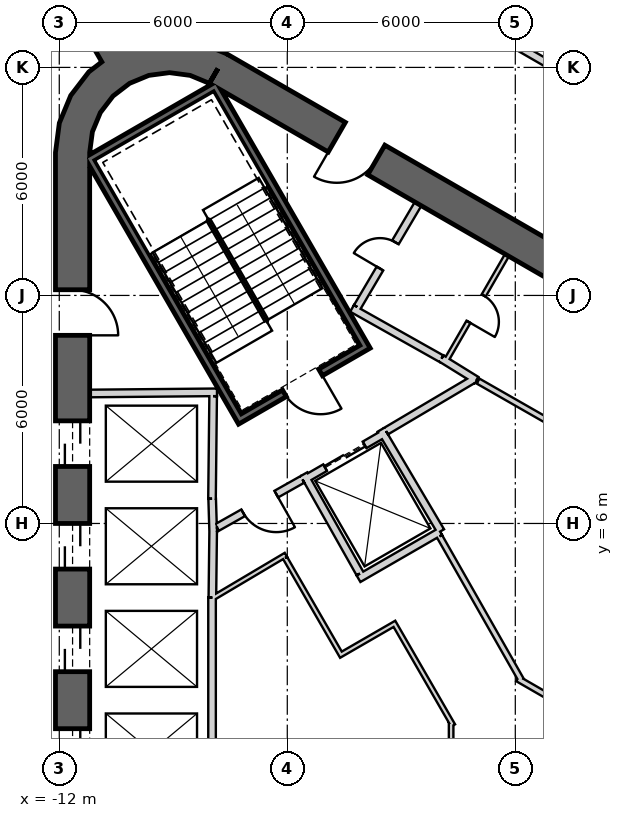
"""IFC4 building model, lengths in metres.
Left out: names, types, materials, properties, quantities, classifications, styles, units other than length and angle.
Written with IfcOpenShell. Run it as: python <this file> out.ifc"""

import sys

from ifc_helpers import new_model, si_unit, direction, frame, frame_2d, origin, place, context, subcontext, project, spatial, polyline, rectangle, outline, extrude, element, fill, save


model = new_model("IFC4")
c1 = context("Model", 3, precision=1e-05, world=origin(), true_north=direction((0.0, 1.0)))
c2 = subcontext(c1, "Body", "Model", "MODEL_VIEW")
j1 = project(units=[si_unit("LENGTHUNIT", "METRE"), si_unit("PLANEANGLEUNIT", "RADIAN")], contexts=[c1])
p1 = place(None, origin())
s1 = spatial("IfcSite", under=j1, at=p1, CompositionType="ELEMENT")
p2 = place(p1, origin())
s2 = spatial("IfcBuilding", under=s1, at=p2, CompositionType="ELEMENT")
p3 = place(p2, frame((0.0, 0.0, 169.2)))
s3 = spatial("IfcBuildingStorey", under=s2, at=p3, CompositionType="ELEMENT", Elevation=169.2)
p4 = place(p3, frame((19.475, 2.208, 0.0), z_axis=(0.0, 0.0, 1.0), x_axis=(-0.866028369851, 0.499994862586, 0.0)))
e1 = element("IfcWall", 1, at=p4, inside=s3, PredefinedType="SHEAR", context=c2, shape_type="SweptSolid", body=[
    extrude(rectangle(XDim=31.523, YDim=0.9, at=frame_2d((15.762, 0.0))), origin(), (0.0, 0.0, 1.0), 4.0),
])
p5 = place(p4, frame((7.062, 0.0, 0.0)))
e2 = element("IfcOpeningElement", 2, at=p5, cuts=e1, PredefinedType="OPENING", context=c2, shape_type="SweptSolid", body=[
    extrude(rectangle(XDim=1.2, YDim=2.4, at=frame_2d((0.6, 1.2))), frame((0.0, 0.46, 0.0), z_axis=(0.0, -1.0, 0.0), x_axis=(1.0, 0.0, 0.0)), (0.0, 0.0, 1.0), 0.92),
])
p6 = place(p4, frame((3.612, 0.0, 0.0)))
e3 = element("IfcOpeningElement", 3, at=p6, cuts=e1, PredefinedType="OPENING", context=c2, shape_type="SweptSolid", body=[
    extrude(rectangle(XDim=1.2, YDim=2.4, at=frame_2d((0.6, 1.2))), frame((0.0, 0.46, 0.0), z_axis=(0.0, -1.0, 0.0), x_axis=(1.0, 0.0, 0.0)), (0.0, 0.0, 1.0), 0.92),
])
p7 = place(p4, frame((26.712, 0.0, 0.0)))
e4 = element("IfcOpeningElement", 4, at=p7, cuts=e1, PredefinedType="OPENING", context=c2, shape_type="SweptSolid", body=[
    extrude(rectangle(XDim=1.2, YDim=2.4, at=frame_2d((0.6, 1.2))), frame((0.0, 0.46, 0.0), z_axis=(0.0, -1.0, 0.0), x_axis=(1.0, 0.0, 0.0)), (0.0, 0.0, 1.0), 0.92),
])
p8 = place(p3, frame((-11.65, 15.762, 0.0), z_axis=(0.0, 0.0, 1.0), x_axis=(0.0, -1.0, 0.0)))
e5 = element("IfcWall", 5, at=p8, inside=s3, PredefinedType="SHEAR", context=c2, shape_type="SweptSolid", body=[
    extrude(rectangle(XDim=31.523, YDim=0.9, at=frame_2d((15.762, 0.0))), origin(), (0.0, 0.0, 1.0), 4.0),
])
p9 = place(p8, frame((7.062, 0.0, 0.0)))
e6 = element("IfcOpeningElement", 6, at=p9, cuts=e5, PredefinedType="OPENING", context=c2, shape_type="SweptSolid", body=[
    extrude(rectangle(XDim=1.2, YDim=2.4, at=frame_2d((0.6, 1.2))), frame((0.0, 0.46, 0.0), z_axis=(0.0, -1.0, 0.0), x_axis=(1.0, 0.0, 0.0)), (0.0, 0.0, 1.0), 0.92),
])
p10 = place(p8, frame((9.762, 0.0, 0.0)))
e7 = element("IfcOpeningElement", 7, at=p10, cuts=e5, PredefinedType="OPENING", context=c2, shape_type="SweptSolid", body=[
    extrude(rectangle(XDim=1.2, YDim=2.4, at=frame_2d((0.6, 1.2))), frame((0.0, 0.46, 0.0), z_axis=(0.0, -1.0, 0.0), x_axis=(1.0, 0.0, 0.0)), (0.0, 0.0, 1.0), 0.92),
])
p11 = place(p8, frame((12.462, 0.0, 0.0)))
e8 = element("IfcOpeningElement", 8, at=p11, cuts=e5, PredefinedType="OPENING", context=c2, shape_type="SweptSolid", body=[
    extrude(rectangle(XDim=1.2, YDim=2.4, at=frame_2d((0.6, 1.2))), frame((0.0, 0.46, 0.0), z_axis=(0.0, -1.0, 0.0), x_axis=(1.0, 0.0, 0.0)), (0.0, 0.0, 1.0), 0.92),
])
p12 = place(p8, frame((15.162, 0.0, 0.0)))
e9 = element("IfcOpeningElement", 9, at=p12, cuts=e5, PredefinedType="OPENING", context=c2, shape_type="SweptSolid", body=[
    extrude(rectangle(XDim=1.2, YDim=2.4, at=frame_2d((0.6, 1.2))), frame((0.0, 0.46, 0.0), z_axis=(0.0, -1.0, 0.0), x_axis=(1.0, 0.0, 0.0)), (0.0, 0.0, 1.0), 0.92),
])
p13 = place(p8, frame((17.862, 0.0, 0.0)))
e10 = element("IfcOpeningElement", 10, at=p13, cuts=e5, PredefinedType="OPENING", context=c2, shape_type="SweptSolid", body=[
    extrude(rectangle(XDim=1.2, YDim=2.4, at=frame_2d((0.6, 1.2))), frame((0.0, 0.46, 0.0), z_axis=(0.0, -1.0, 0.0), x_axis=(1.0, 0.0, 0.0)), (0.0, 0.0, 1.0), 0.92),
])
p14 = place(p8, frame((20.562, 0.0, 0.0)))
e11 = element("IfcOpeningElement", 11, at=p14, cuts=e5, PredefinedType="OPENING", context=c2, shape_type="SweptSolid", body=[
    extrude(rectangle(XDim=1.2, YDim=2.4, at=frame_2d((0.6, 1.2))), frame((0.0, 0.46, 0.0), z_axis=(0.0, -1.0, 0.0), x_axis=(1.0, 0.0, 0.0)), (0.0, 0.0, 1.0), 0.92),
])
p15 = place(p8, frame((23.262, 0.0, 0.0)))
e12 = element("IfcOpeningElement", 12, at=p15, cuts=e5, PredefinedType="OPENING", context=c2, shape_type="SweptSolid", body=[
    extrude(rectangle(XDim=1.2, YDim=2.4, at=frame_2d((0.6, 1.2))), frame((0.0, 0.46, 0.0), z_axis=(0.0, -1.0, 0.0), x_axis=(1.0, 0.0, 0.0)), (0.0, 0.0, 1.0), 0.92),
])
p16 = place(p8, frame((3.612, 0.0, 0.0)))
e13 = element("IfcOpeningElement", 13, at=p16, cuts=e5, PredefinedType="OPENING", context=c2, shape_type="SweptSolid", body=[
    extrude(rectangle(XDim=1.2, YDim=2.4, at=frame_2d((0.6, 1.2))), frame((0.0, 0.46, 0.0), z_axis=(0.0, -1.0, 0.0), x_axis=(1.0, 0.0, 0.0)), (0.0, 0.0, 1.0), 0.92),
])
p17 = place(p8, frame((26.712, 0.0, 0.0)))
e14 = element("IfcOpeningElement", 14, at=p17, cuts=e5, PredefinedType="OPENING", context=c2, shape_type="SweptSolid", body=[
    extrude(rectangle(XDim=1.2, YDim=2.4, at=frame_2d((0.6, 1.2))), frame((0.0, 0.46, 0.0), z_axis=(0.0, -1.0, 0.0), x_axis=(1.0, 0.0, 0.0)), (0.0, 0.0, 1.0), 0.92),
])
p18 = place(p3, origin())
e15 = element("IfcWall", 15, at=p18, inside=s3, PredefinedType="SHEAR", context=c2, shape_type="SweptSolid", body=[
    extrude(outline(polyline([(-7.6, 18.36), (-8.323, 18.659), (-9.1, 18.762), (-9.876, 18.659), (-10.6, 18.36), (-11.221, 17.883), (-11.698, 17.262), (-11.998, 16.538), (-12.1, 15.762), (-11.2, 15.762), (-11.128, 16.305), (-10.919, 16.812), (-10.585, 17.247), (-10.15, 17.58), (-9.644, 17.79), (-9.1, 17.862), (-8.556, 17.79), (-8.05, 17.58), (-7.6, 18.36)])), origin(), (0.0, 0.0, 1.0), 4.0),
])
p19 = place(p3, frame((-10.575, 18.316, 0.0), z_axis=(0.0, 0.0, 1.0), x_axis=(-0.499995558535, 0.86602796805, 0.0)))
e16 = element("IfcWall", 16, at=p19, inside=s3, PredefinedType="SHEAR", context=c2, shape_type="SweptSolid", body=[
    extrude(rectangle(XDim=12.433, YDim=0.7, at=frame_2d((6.216, 0.0))), origin(), (0.0, 0.0, 1.0), 4.0),
])
p20 = place(p3, frame((-11.2, 9.42, 0.0), z_axis=(0.0, 0.0, 1.0), x_axis=(0.999957167047, 0.009255488683, 0.0)))
e17 = element("IfcWall", 17, at=p20, inside=s3, PredefinedType="PLUMBINGWALL", context=c2, shape_type="SweptSolid", body=[
    extrude(rectangle(XDim=3.35, YDim=0.2, at=frame_2d((1.675, 0.0))), origin(), (0.0, 0.0, 1.0), 3.7),
])
p21 = place(p3, frame((-7.951, 9.35, 0.0), z_axis=(0.0, 0.0, 1.0), x_axis=(-0.011120469654, -0.999938165666, 0.0)))
e18 = element("IfcWall", 18, at=p21, inside=s3, PredefinedType="PLUMBINGWALL", context=c2, shape_type="SweptSolid", body=[
    extrude(rectangle(XDim=2.7, YDim=0.2, at=frame_2d((1.35, 0.0))), origin(), (0.0, 0.0, 1.0), 3.7),
])
p22 = place(p3, frame((-7.977, 6.65, 0.0), z_axis=(0.0, 0.0, 1.0), x_axis=(0.030861509705, -0.999523670164, 0.0)))
e19 = element("IfcWall", 19, at=p22, inside=s3, PredefinedType="PLUMBINGWALL", context=c2, shape_type="SweptSolid", body=[
    extrude(rectangle(XDim=0.878, YDim=0.2, at=frame_2d((0.439, 0.0))), origin(), (0.0, 0.0, 1.0), 3.7),
])
p23 = place(p3, frame((-7.949, 5.895, 0.0), z_axis=(0.0, 0.0, 1.0), x_axis=(-0.012042535896, -0.999927486035, 0.0)))
e20 = element("IfcWall", 20, at=p23, inside=s3, PredefinedType="PLUMBINGWALL", context=c2, shape_type="SweptSolid", body=[
    extrude(rectangle(XDim=1.845, YDim=0.2, at=frame_2d((0.922, 0.0))), origin(), (0.0, 0.0, 1.0), 3.7),
])
p24 = place(p3, frame((-7.98, 4.05, 0.0), z_axis=(0.0, 0.0, 1.0), x_axis=(0.0, -1.0, 0.0)))
e21 = element("IfcWall", 21, at=p24, inside=s3, PredefinedType="PLUMBINGWALL", context=c2, shape_type="SweptSolid", body=[
    extrude(rectangle(XDim=8.1, YDim=0.2, at=frame_2d((4.05, 0.0))), origin(), (0.0, 0.0, 1.0), 3.7),
])
p25 = place(p3, frame((-11.245, 15.678, -0.3), z_axis=(0.0, 0.0, 1.0), x_axis=(0.499977274689, -0.866038523851, 0.0)))
e22 = element("IfcWall", 22, at=p25, inside=s3, PredefinedType="SHEAR", context=c2, shape_type="SweptSolid", body=[
    extrude(rectangle(XDim=8.1, YDim=0.2, at=frame_2d((4.05, 0.0))), origin(), (0.0, 0.0, 1.0), 4.0),
])
p26 = place(p3, frame((-7.818, 17.541, -0.3), z_axis=(0.0, 0.0, 1.0), x_axis=(-0.866044365799, -0.499967155389, 0.0)))
e23 = element("IfcWall", 23, at=p26, inside=s3, PredefinedType="SHEAR", context=c2, shape_type="SweptSolid", body=[
    extrude(rectangle(XDim=3.8, YDim=0.2, at=frame_2d((1.9, 0.0))), origin(), (0.0, 0.0, 1.0), 4.0),
])
p27 = place(p3, frame((-7.854, 17.405, -0.3), z_axis=(0.0, 0.0, 1.0), x_axis=(0.499997992926, -0.866026562566, 0.0)))
e24 = element("IfcWall", 24, at=p27, inside=s3, PredefinedType="SHEAR", context=c2, shape_type="SweptSolid", body=[
    extrude(rectangle(XDim=7.9, YDim=0.2, at=frame_2d((3.95, 0.0))), origin(), (0.0, 0.0, 1.0), 4.0),
])
p28 = place(p3, frame((-7.159, 8.8, -0.3), z_axis=(0.0, 0.0, 1.0), x_axis=(0.866047807691, 0.499961193289, 0.0)))
e25 = element("IfcWall", 25, at=p28, inside=s3, PredefinedType="SHEAR", context=c2, shape_type="SweptSolid", body=[
    extrude(rectangle(XDim=3.6, YDim=0.2, at=frame_2d((1.8, 0.0))), origin(), (0.0, 0.0, 1.0), 4.0),
])
p29 = place(p28, frame((1.25, 0.0, 0.3)))
e26 = element("IfcOpeningElement", 26, at=p29, cuts=e25, PredefinedType="OPENING", context=c2, shape_type="SweptSolid", body=[
    extrude(rectangle(XDim=1.1, YDim=2.1, at=frame_2d((0.55, 1.05))), frame((0.0, 0.11, 0.0), z_axis=(0.0, -1.0, 0.0), x_axis=(1.0, 0.0, 0.0)), (0.0, 0.0, 1.0), 0.22),
])
p30 = place(p3, frame((-5.524, 7.168, 0.0), z_axis=(0.0, 0.0, 1.0), x_axis=(0.866024647952, 0.500001309137, 0.0)))
e27 = element("IfcWall", 27, at=p30, inside=s3, PredefinedType="PLUMBINGWALL", context=c2, shape_type="SweptSolid", body=[
    extrude(rectangle(XDim=2.4, YDim=0.2, at=frame_2d((1.2, 0.0))), origin(), (0.0, 0.0, 1.0), 3.7),
])
p31 = place(p30, frame((0.6, 0.0, 0.0)))
e28 = element("IfcOpeningElement", 28, at=p31, cuts=e27, PredefinedType="OPENING", context=c2, shape_type="SweptSolid", body=[
    extrude(rectangle(XDim=1.2, YDim=2.4, at=frame_2d((0.6, 1.2))), frame((0.0, 0.11, 0.0), z_axis=(0.0, -1.0, 0.0), x_axis=(1.0, 0.0, 0.0)), (0.0, 0.0, 1.0), 0.22),
])
p32 = place(p3, frame((-3.538, 8.465, 0.0), z_axis=(0.0, 0.0, 1.0), x_axis=(0.508647062354, -0.860975125052, 0.0)))
e29 = element("IfcWall", 29, at=p32, inside=s3, PredefinedType="PLUMBINGWALL", context=c2, shape_type="SweptSolid", body=[
    extrude(rectangle(XDim=3.1, YDim=0.2, at=frame_2d((1.55, 0.0))), origin(), (0.0, 0.0, 1.0), 3.7),
])
p33 = place(p3, frame((-1.979, 5.786, 0.0), z_axis=(0.0, 0.0, 1.0), x_axis=(-0.866016689309, -0.500015093611, 0.0)))
e30 = element("IfcWall", 30, at=p33, inside=s3, PredefinedType="PLUMBINGWALL", context=c2, shape_type="SweptSolid", body=[
    extrude(rectangle(XDim=2.479, YDim=0.2, at=frame_2d((1.24, 0.0))), origin(), (0.0, 0.0, 1.0), 3.7),
])
p34 = place(p3, frame((-5.562, 7.296, 0.0), z_axis=(0.0, 0.0, 1.0), x_axis=(0.49134651263, -0.870964180966, 0.0)))
e31 = element("IfcWall", 31, at=p34, inside=s3, PredefinedType="PLUMBINGWALL", context=c2, shape_type="SweptSolid", body=[
    extrude(rectangle(XDim=3.0, YDim=0.2, at=frame_2d((1.5, 0.0))), origin(), (0.0, 0.0, 1.0), 3.7),
])
p35 = place(p3, frame((-0.22, 13.06, 0.0), z_axis=(0.0, 0.0, 1.0), x_axis=(-0.499984717929, -0.866034226713, 0.0)))
e32 = element("IfcWall", 32, at=p35, inside=s3, PredefinedType="PARTITIONING", context=c2, shape_type="SweptSolid", body=[
    extrude(rectangle(XDim=3.25, YDim=0.12, at=frame_2d((1.625, 0.0))), origin(), (0.0, 0.0, 1.0), 3.7),
])
p36 = place(p35, frame((1.225, 0.0, 0.0)))
e33 = element("IfcOpeningElement", 33, at=p36, cuts=e32, PredefinedType="OPENING", context=c2, shape_type="SweptSolid", body=[
    extrude(rectangle(XDim=0.8, YDim=2.1, at=frame_2d((0.4, 1.05))), frame((0.0, 0.07, 0.0), z_axis=(0.0, -1.0, 0.0), x_axis=(1.0, 0.0, 0.0)), (0.0, 0.0, 1.0), 0.14),
])
p37 = place(p3, frame((-1.941, 10.339, 0.0), z_axis=(0.0, 0.0, 1.0), x_axis=(0.850216889117, -0.526432561171, 0.0)))
e34 = element("IfcWall", 34, at=p37, inside=s3, PredefinedType="PARTITIONING", context=c2, shape_type="SweptSolid", body=[
    extrude(rectangle(XDim=1.078, YDim=0.2, at=frame_2d((0.539, 0.0))), origin(), (0.0, 0.0, 1.0), 3.7),
])
p38 = place(p3, frame((5.159, 6.236, 0.0), z_axis=(0.0, 0.0, 1.0), x_axis=(-0.868105023632, 0.496380567654, 0.0)))
e35 = element("IfcWall", 35, at=p38, inside=s3, PredefinedType="PLUMBINGWALL", context=c2, shape_type="SweptSolid", body=[
    extrude(rectangle(XDim=7.072, YDim=0.15, at=frame_2d((3.536, 0.0))), origin(), (0.0, 0.0, 1.0), 3.7),
])
p39 = place(p3, frame((-4.296, 11.659, 0.0), z_axis=(0.0, 0.0, 1.0), x_axis=(0.871534483978, -0.490334215854, 0.0)))
e36 = element("IfcWall", 36, at=p39, inside=s3, PredefinedType="PARTITIONING", context=c2, shape_type="SweptSolid", body=[
    extrude(rectangle(XDim=2.7, YDim=0.2, at=frame_2d((1.35, 0.0))), origin(), (0.0, 0.0, 1.0), 3.7),
])
p40 = place(p3, frame((-2.558, 14.409, 0.0), z_axis=(0.0, 0.0, 1.0), x_axis=(-0.508018930956, -0.861345903683, 0.0)))
e37 = element("IfcWall", 37, at=p40, inside=s3, PredefinedType="PARTITIONING", context=c2, shape_type="SweptSolid", body=[
    extrude(rectangle(XDim=3.15, YDim=0.2, at=frame_2d((1.575, 0.0))), origin(), (0.0, 0.0, 1.0), 3.7),
])
p41 = place(p40, frame((1.175, 0.0, 0.0)))
e38 = element("IfcOpeningElement", 38, at=p41, cuts=e37, PredefinedType="OPENING", context=c2, shape_type="SweptSolid", body=[
    extrude(rectangle(XDim=0.8, YDim=2.1, at=frame_2d((0.4, 1.05))), frame((0.0, 0.11, 0.0), z_axis=(0.0, -1.0, 0.0), x_axis=(1.0, 0.0, 0.0)), (0.0, 0.0, 1.0), 0.22),
])
p42 = place(p3, frame((-1.055, 9.818, 0.0), z_axis=(0.0, 0.0, 1.0), x_axis=(-0.860614334655, -0.50925726994, 0.0)))
e39 = element("IfcWall", 39, at=p42, inside=s3, PredefinedType="PARTITIONING", context=c2, shape_type="SweptSolid", body=[
    extrude(rectangle(XDim=2.726, YDim=0.2, at=frame_2d((1.363, 0.0))), origin(), (0.0, 0.0, 1.0), 3.7),
])
p43 = place(p3, frame((-5.6, 7.16, 0.0), z_axis=(0.0, 0.0, 1.0), x_axis=(-0.871363259478, -0.490638431059, 0.0)))
e40 = element("IfcWall", 40, at=p43, inside=s3, PredefinedType="PARTITIONING", context=c2, shape_type="SweptSolid", body=[
    extrude(rectangle(XDim=2.581, YDim=0.2, at=frame_2d((1.291, 0.0))), origin(), (0.0, 0.0, 1.0), 3.7),
])
p44 = place(p43, frame((0.791, 0.0, 0.0)))
e41 = element("IfcOpeningElement", 41, at=p44, cuts=e40, PredefinedType="OPENING", context=c2, shape_type="SweptSolid", body=[
    extrude(rectangle(XDim=1.0, YDim=2.1, at=frame_2d((0.5, 1.05))), frame((0.0, 0.11, 0.0), z_axis=(0.0, -1.0, 0.0), x_axis=(1.0, 0.0, 0.0)), (0.0, 0.0, 1.0), 0.22),
])
p45 = place(p3, frame((0.062, 1.914, 0.0), z_axis=(0.0, 0.0, 1.0), x_axis=(0.866018462269, -0.500012022864, 0.0)))
e42 = element("IfcWall", 42, at=p45, inside=s3, PredefinedType="PLUMBINGWALL", context=c2, shape_type="SweptSolid", body=[
    extrude(rectangle(XDim=1.654, YDim=0.15, at=frame_2d((0.827, 0.0))), origin(), (0.0, 0.0, 1.0), 3.7),
])
p46 = place(p3, frame((-1.994, 5.661, 0.0), z_axis=(0.0, 0.0, 1.0), x_axis=(0.494341211302, -0.869267948798, 0.0)))
e43 = element("IfcWall", 43, at=p46, inside=s3, PredefinedType="PLUMBINGWALL", context=c2, shape_type="SweptSolid", body=[
    extrude(rectangle(XDim=4.361, YDim=0.15, at=frame_2d((2.18, 0.0))), origin(), (0.0, 0.0, 1.0), 3.7),
])
p47 = place(p3, frame((-6.037, 5.176, 0.0), z_axis=(0.0, 0.0, 1.0), x_axis=(-0.860106072674, -0.510115225953, 0.0)))
e44 = element("IfcWall", 44, at=p47, inside=s3, PredefinedType="PARTITIONING", context=c2, shape_type="SweptSolid", body=[
    extrude(rectangle(XDim=2.225, YDim=0.12, at=frame_2d((1.112, 0.0))), origin(), (0.0, 0.0, 1.0), 3.7),
])
p48 = place(p3, frame((-4.558, 2.495, 0.0), z_axis=(0.0, 0.0, 1.0), x_axis=(-0.499990139034, 0.866031096941, 0.0)))
e45 = element("IfcWall", 45, at=p48, inside=s3, PredefinedType="PARTITIONING", context=c2, shape_type="SweptSolid", body=[
    extrude(rectangle(XDim=3.0, YDim=0.12, at=frame_2d((1.5, 0.0))), origin(), (0.0, 0.0, 1.0), 3.7),
])
p49 = place(p3, frame((-3.129, 3.39, 0.0), z_axis=(0.0, 0.0, 1.0), x_axis=(-0.866053003207, -0.499952193351, 0.0)))
e46 = element("IfcWall", 46, at=p49, inside=s3, PredefinedType="PARTITIONING", context=c2, shape_type="SweptSolid", body=[
    extrude(rectangle(XDim=1.625, YDim=0.12, at=frame_2d((0.812, 0.0))), origin(), (0.0, 0.0, 1.0), 3.7),
])
p50 = place(p3, frame((-1.637, 0.685, 0.0), z_axis=(0.0, 0.0, 1.0), x_axis=(-0.500006252586, 0.866021793822, 0.0)))
e47 = element("IfcWall", 47, at=p50, inside=s3, PredefinedType="PARTITIONING", context=c2, shape_type="SweptSolid", body=[
    extrude(rectangle(XDim=3.028, YDim=0.12, at=frame_2d((1.514, 0.0))), origin(), (0.0, 0.0, 1.0), 3.7),
])
p51 = place(p3, frame((-1.689, -0.879, 0.0), z_axis=(0.0, 0.0, 1.0), x_axis=(0.0, 1.0, 0.0)))
e48 = element("IfcWall", 48, at=p51, inside=s3, PredefinedType="PARTITIONING", context=c2, shape_type="SweptSolid", body=[
    extrude(rectangle(XDim=1.635, YDim=0.12, at=frame_2d((0.818, 0.0))), origin(), (0.0, 0.0, 1.0), 3.7),
])
p52 = place(p3, frame((4.283, 16.118, 0.0), z_axis=(0.0, 0.0, 1.0), x_axis=(-0.866016186489, 0.500015964484, 0.0)))
e49 = element("IfcWall", 49, at=p52, inside=s3, PredefinedType="PARTITIONING", context=c2, shape_type="SweptSolid", body=[
    extrude(rectangle(XDim=12.096, YDim=0.2, at=frame_2d((6.048, 0.0))), origin(), (0.0, 0.0, 1.0), 2.88),
])
p53 = place(p29, origin())
e50 = element("IfcDoor", 50, at=p53, inside=s3, OperationType="SINGLE_SWING_LEFT", PredefinedType="USERDEFINED", context=c2, shape_type="SweptSolid", body=[
    extrude(rectangle(XDim=1.1, YDim=2.1, at=frame_2d((0.55, 1.05))), frame((0.0, 0.025, 0.0), z_axis=(0.0, -1.0, 0.0), x_axis=(1.0, 0.0, 0.0)), (0.0, 0.0, 1.0), 0.05),
])
fill(e26, e50)
p54 = place(p44, origin())
e51 = element("IfcDoor", 51, at=p54, inside=s3, OperationType="SINGLE_SWING_LEFT", PredefinedType="USERDEFINED", context=c2, shape_type="SweptSolid", body=[
    extrude(rectangle(XDim=1.0, YDim=2.1, at=frame_2d((0.5, 1.05))), frame((0.0, 0.025, 0.0), z_axis=(0.0, -1.0, 0.0), x_axis=(1.0, 0.0, 0.0)), (0.0, 0.0, 1.0), 0.05),
])
fill(e41, e51)
p55 = place(p31, origin())
e52 = element("IfcDoor", 52, at=p55, inside=s3, OperationType="SLIDING_TO_LEFT", PredefinedType="USERDEFINED", context=c2, shape_type="SweptSolid", body=[
    extrude(rectangle(XDim=1.2, YDim=2.4, at=frame_2d((0.6, 1.2))), frame((0.0, 0.025, 0.0), z_axis=(0.0, -1.0, 0.0), x_axis=(1.0, 0.0, 0.0)), (0.0, 0.0, 1.0), 0.05),
])
fill(e28, e52)
p56 = place(p41, origin())
e53 = element("IfcDoor", 53, at=p56, inside=s3, OperationType="SINGLE_SWING_LEFT", PredefinedType="USERDEFINED", context=c2, shape_type="SweptSolid", body=[
    extrude(rectangle(XDim=0.8, YDim=2.1, at=frame_2d((0.4, 1.05))), frame((0.0, 0.025, 0.0), z_axis=(0.0, -1.0, 0.0), x_axis=(1.0, 0.0, 0.0)), (0.0, 0.0, 1.0), 0.05),
])
fill(e38, e53)
p57 = place(p36, origin())
e54 = element("IfcDoor", 54, at=p57, inside=s3, OperationType="SINGLE_SWING_LEFT", PredefinedType="USERDEFINED", context=c2, shape_type="SweptSolid", body=[
    extrude(rectangle(XDim=0.8, YDim=2.1, at=frame_2d((0.4, 1.05))), frame((0.0, 0.025, 0.0), z_axis=(0.0, -1.0, 0.0), x_axis=(1.0, 0.0, 0.0)), (0.0, 0.0, 1.0), 0.05),
])
fill(e33, e54)
p58 = place(p9, origin())
e55 = element("IfcDoor", 55, at=p58, inside=s3, OperationType="SLIDING_TO_LEFT", PredefinedType="USERDEFINED", context=c2, shape_type="SweptSolid", body=[
    extrude(rectangle(XDim=1.2, YDim=2.4, at=frame_2d((0.6, 1.2))), frame((0.0, 0.025, 0.0), z_axis=(0.0, -1.0, 0.0), x_axis=(1.0, 0.0, 0.0)), (0.0, 0.0, 1.0), 0.05),
])
fill(e6, e55)
p59 = place(p10, origin())
e56 = element("IfcDoor", 56, at=p59, inside=s3, OperationType="SLIDING_TO_LEFT", PredefinedType="USERDEFINED", context=c2, shape_type="SweptSolid", body=[
    extrude(rectangle(XDim=1.2, YDim=2.4, at=frame_2d((0.6, 1.2))), frame((0.0, 0.025, 0.0), z_axis=(0.0, -1.0, 0.0), x_axis=(1.0, 0.0, 0.0)), (0.0, 0.0, 1.0), 0.05),
])
fill(e7, e56)
p60 = place(p11, origin())
e57 = element("IfcDoor", 57, at=p60, inside=s3, OperationType="SLIDING_TO_LEFT", PredefinedType="USERDEFINED", context=c2, shape_type="SweptSolid", body=[
    extrude(rectangle(XDim=1.2, YDim=2.4, at=frame_2d((0.6, 1.2))), frame((0.0, 0.025, 0.0), z_axis=(0.0, -1.0, 0.0), x_axis=(1.0, 0.0, 0.0)), (0.0, 0.0, 1.0), 0.05),
])
fill(e8, e57)
p61 = place(p12, origin())
e58 = element("IfcDoor", 58, at=p61, inside=s3, OperationType="SLIDING_TO_LEFT", PredefinedType="USERDEFINED", context=c2, shape_type="SweptSolid", body=[
    extrude(rectangle(XDim=1.2, YDim=2.4, at=frame_2d((0.6, 1.2))), frame((0.0, 0.025, 0.0), z_axis=(0.0, -1.0, 0.0), x_axis=(1.0, 0.0, 0.0)), (0.0, 0.0, 1.0), 0.05),
])
fill(e9, e58)
p62 = place(p7, origin())
e59 = element("IfcDoor", 59, at=p62, inside=s3, OperationType="SINGLE_SWING_LEFT", PredefinedType="USERDEFINED", context=c2, shape_type="SweptSolid", body=[
    extrude(rectangle(XDim=1.2, YDim=2.4, at=frame_2d((0.6, 1.2))), frame((0.0, 0.025, 0.0), z_axis=(0.0, -1.0, 0.0), x_axis=(1.0, 0.0, 0.0)), (0.0, 0.0, 1.0), 0.05),
])
fill(e4, e59)
p63 = place(p16, origin())
e60 = element("IfcDoor", 60, at=p63, inside=s3, OperationType="SINGLE_SWING_RIGHT", PredefinedType="USERDEFINED", context=c2, shape_type="SweptSolid", body=[
    extrude(rectangle(XDim=1.2, YDim=2.4, at=frame_2d((0.6, 1.2))), frame((0.0, 0.025, 0.0), z_axis=(0.0, -1.0, 0.0), x_axis=(1.0, 0.0, 0.0)), (0.0, 0.0, 1.0), 0.05),
])
fill(e13, e60)
save(model, sys.argv[1])
